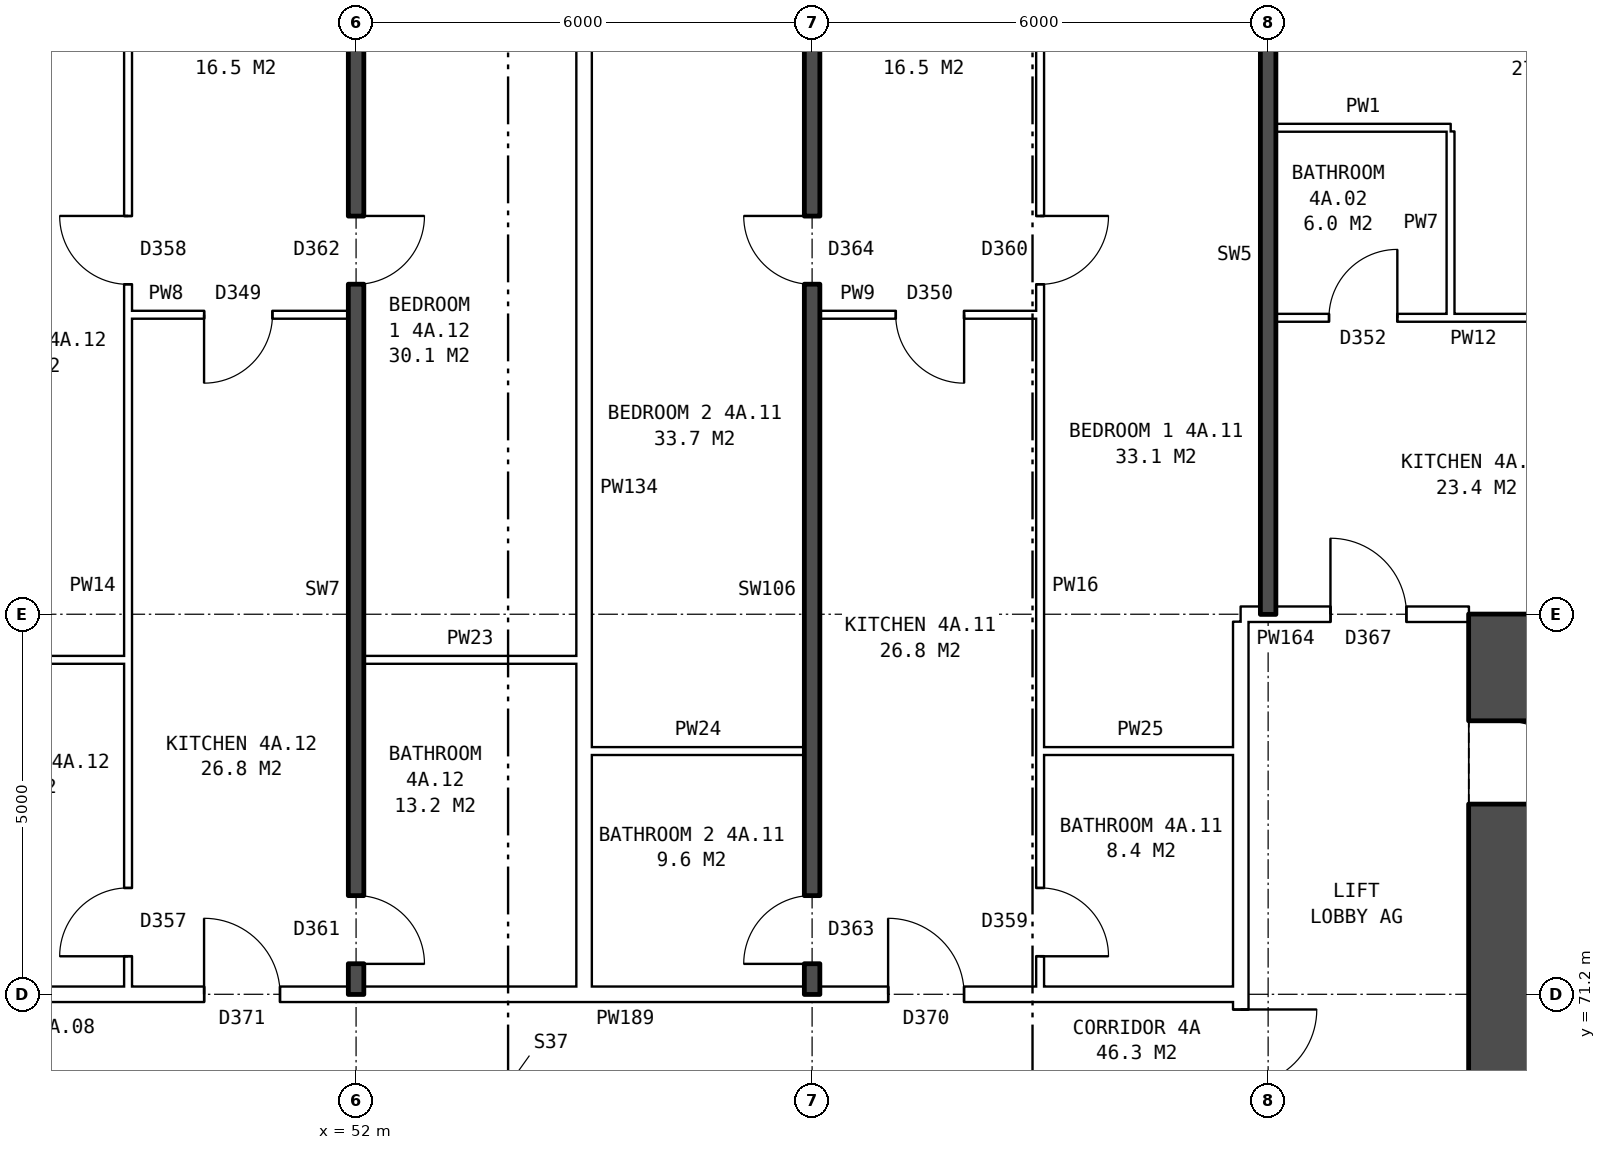
"""IFC4 building model, lengths in metres.
Left out: names, types, materials, properties, quantities, classifications, styles, units other than length and angle.
Written with IfcOpenShell. Run it as: python <this file> out.ifc"""

import sys

from ifc_helpers import new_model, si_unit, direction, frame, frame_2d, origin, place, context, subcontext, project, spatial, rectangle, extrude, element, fill, save


model = new_model("IFC4")
c1 = context("Model", 3, precision=1e-05, world=origin(), true_north=direction((0.0, 1.0)))
c2 = subcontext(c1, "Body", "Model", "MODEL_VIEW")
j1 = project(units=[si_unit("LENGTHUNIT", "METRE"), si_unit("PLANEANGLEUNIT", "RADIAN")], contexts=[c1])
p1 = place(None, origin())
s1 = spatial("IfcSite", under=j1, at=p1, CompositionType="ELEMENT")
p2 = place(p1, origin())
s2 = spatial("IfcBuilding", under=s1, at=p2, CompositionType="ELEMENT")
p3 = place(p2, frame((0.0, 0.0, 19.5)))
s3 = spatial("IfcBuildingStorey", under=s2, at=p3, CompositionType="ELEMENT", Elevation=19.5)
p4 = place(p3, frame((67.09, 64.7, 0.0), z_axis=(0.0, 0.0, 1.0), x_axis=(0.0, 1.0, 0.0)))
e1 = element("IfcWall", 1, at=p4, inside=s3, PredefinedType="SHEAR", context=c2, shape_type="SweptSolid", body=[
    extrude(rectangle(XDim=10.6, YDim=0.9, at=frame_2d((5.3, 0.0))), origin(), (0.0, 0.0, 1.0), 2.85),
])
p5 = place(p4, frame((0.425, 0.0, 0.0)))
e2 = element("IfcOpeningElement", 2, at=p5, cuts=e1, PredefinedType="OPENING", context=c2, shape_type="SweptSolid", body=[
    extrude(rectangle(XDim=1.1, YDim=2.1, at=frame_2d((0.55, 1.05))), frame((0.0, 0.46, 0.0), z_axis=(0.0, -1.0, 0.0), x_axis=(1.0, 0.0, 0.0)), (0.0, 0.0, 1.0), 0.92),
])
p6 = place(p4, frame((9.0, 0.0, 0.0)))
e3 = element("IfcOpeningElement", 3, at=p6, cuts=e1, PredefinedType="OPENING", context=c2, shape_type="SweptSolid", body=[
    extrude(rectangle(XDim=1.1, YDim=2.1, at=frame_2d((0.55, 1.05))), frame((0.0, 0.46, 0.0), z_axis=(0.0, -1.0, 0.0), x_axis=(1.0, 0.0, 0.0)), (0.0, 0.0, 1.0), 0.92),
])
p7 = place(p3, frame((66.64, 75.75, 0.0), z_axis=(0.0, 0.0, 1.0), x_axis=(1.0, 0.0, 0.0)))
e4 = element("IfcWall", 4, at=p7, inside=s3, PredefinedType="SHEAR", context=c2, shape_type="SweptSolid", body=[
    extrude(rectangle(XDim=9.0, YDim=0.9, at=frame_2d((4.5, 0.0))), origin(), (0.0, 0.0, 1.0), 2.85),
])
p8 = place(p3, frame((63.64, 63.9, 0.0), z_axis=(0.0, 0.0, 1.0), x_axis=(0.0, 1.0, 0.0)))
e5 = element("IfcWall", 5, at=p8, inside=s3, PredefinedType="PARTITIONING", context=c2, shape_type="SweptSolid", body=[
    extrude(rectangle(XDim=12.2, YDim=0.2, at=frame_2d((6.1, 0.0))), origin(), (0.0, 0.0, 1.0), 2.85),
])
p9 = place(p8, frame((5.1, 0.0, 0.0)))
e6 = element("IfcOpeningElement", 6, at=p9, cuts=e5, PredefinedType="OPENING", context=c2, shape_type="SweptSolid", body=[
    extrude(rectangle(XDim=2.0, YDim=2.1, at=frame_2d((1.0, 1.05))), frame((0.0, 0.11, 0.0), z_axis=(0.0, -1.0, 0.0), x_axis=(1.0, 0.0, 0.0)), (0.0, 0.0, 1.0), 0.22),
])
p10 = place(p3, frame((44.36, 71.2, 0.0), z_axis=(0.0, 0.0, 1.0), x_axis=(1.0, 0.0, 0.0)))
e7 = element("IfcWall", 7, at=p10, inside=s3, PredefinedType="PARTITIONING", context=c2, shape_type="SweptSolid", body=[
    extrude(rectangle(XDim=19.28, YDim=0.2, at=frame_2d((9.64, 0.0))), origin(), (0.0, 0.0, 1.0), 2.85),
])
p11 = place(p10, frame((14.64, 0.0, 0.0)))
e8 = element("IfcOpeningElement", 8, at=p11, cuts=e7, PredefinedType="OPENING", context=c2, shape_type="SweptSolid", body=[
    extrude(rectangle(XDim=1.0, YDim=2.1, at=frame_2d((0.5, 1.05))), frame((0.0, 0.11, 0.0), z_axis=(0.0, -1.0, 0.0), x_axis=(1.0, 0.0, 0.0)), (0.0, 0.0, 1.0), 0.22),
])
p12 = place(p10, frame((5.64, 0.0, 0.0)))
e9 = element("IfcOpeningElement", 9, at=p12, cuts=e7, PredefinedType="OPENING", context=c2, shape_type="SweptSolid", body=[
    extrude(rectangle(XDim=1.0, YDim=2.1, at=frame_2d((0.5, 1.05))), frame((0.0, 0.11, 0.0), z_axis=(0.0, -1.0, 0.0), x_axis=(1.0, 0.0, 0.0)), (0.0, 0.0, 1.0), 0.22),
])
p13 = place(p3, frame((55.1, 74.4, 0.0), z_axis=(0.0, 0.0, 1.0), x_axis=(1.0, 0.0, 0.0)))
e10 = element("IfcWall", 10, at=p13, inside=s3, PredefinedType="PARTITIONING", context=c2, shape_type="SweptSolid", body=[
    extrude(rectangle(XDim=2.8, YDim=0.1, at=frame_2d((1.4, 0.0))), origin(), (0.0, 0.0, 1.0), 2.85),
])
p14 = place(p3, frame((61.0, 74.4, 0.0), z_axis=(0.0, 0.0, 1.0), x_axis=(1.0, 0.0, 0.0)))
e11 = element("IfcWall", 11, at=p14, inside=s3, PredefinedType="PARTITIONING", context=c2, shape_type="SweptSolid", body=[
    extrude(rectangle(XDim=2.64, YDim=0.1, at=frame_2d((1.32, 0.0))), origin(), (0.0, 0.0, 1.0), 2.85),
])
p15 = place(p3, frame((46.1, 75.6, 0.0), z_axis=(0.0, 0.0, 1.0), x_axis=(1.0, 0.0, 0.0)))
e12 = element("IfcWall", 12, at=p15, inside=s3, PredefinedType="PARTITIONING", context=c2, shape_type="SweptSolid", body=[
    extrude(rectangle(XDim=2.9, YDim=0.1, at=frame_2d((1.45, 0.0))), origin(), (0.0, 0.0, 1.0), 2.85),
])
p16 = place(p3, frame((52.1, 75.6, 0.0), z_axis=(0.0, 0.0, 1.0), x_axis=(1.0, 0.0, 0.0)))
e13 = element("IfcWall", 13, at=p16, inside=s3, PredefinedType="PARTITIONING", context=c2, shape_type="SweptSolid", body=[
    extrude(rectangle(XDim=2.8, YDim=0.1, at=frame_2d((1.4, 0.0))), origin(), (0.0, 0.0, 1.0), 2.85),
])
p17 = place(p3, frame((63.64, 76.2, 0.0), z_axis=(0.0, 0.0, 1.0), x_axis=(1.0, 0.0, 0.0)))
e14 = element("IfcWall", 14, at=p17, inside=s3, PredefinedType="PARTITIONING", context=c2, shape_type="SweptSolid", body=[
    extrude(rectangle(XDim=3.0, YDim=0.2, at=frame_2d((1.5, 0.0))), origin(), (0.0, 0.0, 1.0), 2.85),
])
p18 = place(p17, frame((1.18, 0.0, 0.0)))
e15 = element("IfcOpeningElement", 15, at=p18, cuts=e14, PredefinedType="OPENING", context=c2, shape_type="SweptSolid", body=[
    extrude(rectangle(XDim=1.0, YDim=2.1, at=frame_2d((0.5, 1.05))), frame((0.0, 0.11, 0.0), z_axis=(0.0, -1.0, 0.0), x_axis=(1.0, 0.0, 0.0)), (0.0, 0.0, 1.0), 0.22),
])
p19 = place(p3, frame((64.1, 80.1, 0.0), z_axis=(0.0, 0.0, 1.0), x_axis=(1.0, 0.0, 0.0)))
e16 = element("IfcWall", 16, at=p19, inside=s3, PredefinedType="PARTITIONING", context=c2, shape_type="SweptSolid", body=[
    extrude(rectangle(XDim=5.8, YDim=0.1, at=frame_2d((2.9, 0.0))), origin(), (0.0, 0.0, 1.0), 2.85),
])
p20 = place(p19, frame((3.6, 0.0, 0.0)))
e17 = element("IfcOpeningElement", 17, at=p20, cuts=e16, PredefinedType="OPENING", context=c2, shape_type="SweptSolid", body=[
    extrude(rectangle(XDim=0.9, YDim=2.1, at=frame_2d((0.45, 1.05))), frame((0.0, 0.06, 0.0), z_axis=(0.0, -1.0, 0.0), x_axis=(1.0, 0.0, 0.0)), (0.0, 0.0, 1.0), 0.12),
])
p21 = place(p19, frame((0.7, 0.0, 0.0)))
e18 = element("IfcOpeningElement", 18, at=p21, cuts=e16, PredefinedType="OPENING", context=c2, shape_type="SweptSolid", body=[
    extrude(rectangle(XDim=0.9, YDim=2.1, at=frame_2d((0.45, 1.05))), frame((0.0, 0.06, 0.0), z_axis=(0.0, -1.0, 0.0), x_axis=(1.0, 0.0, 0.0)), (0.0, 0.0, 1.0), 0.12),
])
p22 = place(p3, frame((49.0, 80.14, 0.0), z_axis=(0.0, 0.0, 1.0), x_axis=(1.0, 0.0, 0.0)))
e19 = element("IfcWall", 19, at=p22, inside=s3, PredefinedType="PARTITIONING", context=c2, shape_type="SweptSolid", body=[
    extrude(rectangle(XDim=2.9, YDim=0.1, at=frame_2d((1.45, 0.0))), origin(), (0.0, 0.0, 1.0), 2.85),
])
p23 = place(p22, frame((1.0, 0.0, 0.0)))
e20 = element("IfcOpeningElement", 20, at=p23, cuts=e19, PredefinedType="OPENING", context=c2, shape_type="SweptSolid", body=[
    extrude(rectangle(XDim=0.9, YDim=2.1, at=frame_2d((0.45, 1.05))), frame((0.0, 0.06, 0.0), z_axis=(0.0, -1.0, 0.0), x_axis=(1.0, 0.0, 0.0)), (0.0, 0.0, 1.0), 0.12),
])
p24 = place(p3, frame((58.1, 80.14, 0.0), z_axis=(0.0, 0.0, 1.0), x_axis=(1.0, 0.0, 0.0)))
e21 = element("IfcWall", 21, at=p24, inside=s3, PredefinedType="PARTITIONING", context=c2, shape_type="SweptSolid", body=[
    extrude(rectangle(XDim=2.9, YDim=0.1, at=frame_2d((1.45, 0.0))), origin(), (0.0, 0.0, 1.0), 2.85),
])
p25 = place(p24, frame((1.0, 0.0, 0.0)))
e22 = element("IfcOpeningElement", 22, at=p25, cuts=e21, PredefinedType="OPENING", context=c2, shape_type="SweptSolid", body=[
    extrude(rectangle(XDim=0.9, YDim=2.1, at=frame_2d((0.45, 1.05))), frame((0.0, 0.06, 0.0), z_axis=(0.0, -1.0, 0.0), x_axis=(1.0, 0.0, 0.0)), (0.0, 0.0, 1.0), 0.12),
])
p26 = place(p3, frame((64.1, 82.6, 0.0), z_axis=(0.0, 0.0, 1.0), x_axis=(1.0, 0.0, 0.0)))
e23 = element("IfcWall", 23, at=p26, inside=s3, PredefinedType="PARTITIONING", context=c2, shape_type="SweptSolid", body=[
    extrude(rectangle(XDim=2.3, YDim=0.1, at=frame_2d((1.15, 0.0))), origin(), (0.0, 0.0, 1.0), 2.85),
])
p27 = place(p3, frame((49.0, 71.3, 0.0), z_axis=(0.0, 0.0, 1.0), x_axis=(0.0, 1.0, 0.0)))
e24 = element("IfcWall", 24, at=p27, inside=s3, PredefinedType="PARTITIONING", context=c2, shape_type="SweptSolid", body=[
    extrude(rectangle(XDim=14.34, YDim=0.1, at=frame_2d((7.17, 0.0))), origin(), (0.0, 0.0, 1.0), 2.85),
])
p28 = place(p27, frame((9.24, 0.0, 0.0)))
e25 = element("IfcOpeningElement", 25, at=p28, cuts=e24, PredefinedType="OPENING", context=c2, shape_type="SweptSolid", body=[
    extrude(rectangle(XDim=0.9, YDim=2.1, at=frame_2d((0.45, 1.05))), frame((0.0, 0.06, 0.0), z_axis=(0.0, -1.0, 0.0), x_axis=(1.0, 0.0, 0.0)), (0.0, 0.0, 1.0), 0.12),
])
p29 = place(p27, frame((0.4, 0.0, 0.0)))
e26 = element("IfcOpeningElement", 26, at=p29, cuts=e24, PredefinedType="OPENING", context=c2, shape_type="SweptSolid", body=[
    extrude(rectangle(XDim=0.9, YDim=2.1, at=frame_2d((0.45, 1.05))), frame((0.0, 0.06, 0.0), z_axis=(0.0, -1.0, 0.0), x_axis=(1.0, 0.0, 0.0)), (0.0, 0.0, 1.0), 0.12),
])
p30 = place(p3, frame((52.0, 71.2, 0.0), z_axis=(0.0, 0.0, 1.0), x_axis=(0.0, 1.0, 0.0)))
e27 = element("IfcWall", 27, at=p30, inside=s3, PredefinedType="SOLIDWALL", context=c2, shape_type="SweptSolid", body=[
    extrude(rectangle(XDim=14.44, YDim=0.2, at=frame_2d((7.22, 0.0))), origin(), (0.0, 0.0, 1.0), 2.85),
])
p31 = place(p30, frame((9.34, 0.0, 0.0)))
e28 = element("IfcOpeningElement", 28, at=p31, cuts=e27, PredefinedType="OPENING", context=c2, shape_type="SweptSolid", body=[
    extrude(rectangle(XDim=0.9, YDim=2.1, at=frame_2d((0.45, 1.05))), frame((0.0, 0.11, 0.0), z_axis=(0.0, -1.0, 0.0), x_axis=(1.0, 0.0, 0.0)), (0.0, 0.0, 1.0), 0.22),
])
p32 = place(p30, frame((0.4, 0.0, 0.0)))
e29 = element("IfcOpeningElement", 29, at=p32, cuts=e27, PredefinedType="OPENING", context=c2, shape_type="SweptSolid", body=[
    extrude(rectangle(XDim=0.9, YDim=2.1, at=frame_2d((0.45, 1.05))), frame((0.0, 0.11, 0.0), z_axis=(0.0, -1.0, 0.0), x_axis=(1.0, 0.0, 0.0)), (0.0, 0.0, 1.0), 0.22),
])
p33 = place(p3, frame((55.0, 71.3, 0.0), z_axis=(0.0, 0.0, 1.0), x_axis=(0.0, 1.0, 0.0)))
e30 = element("IfcWall", 30, at=p33, inside=s3, PredefinedType="PARTITIONING", context=c2, shape_type="SweptSolid", body=[
    extrude(rectangle(XDim=14.34, YDim=0.2, at=frame_2d((7.17, 0.0))), origin(), (0.0, 0.0, 1.0), 2.85),
])
p34 = place(p3, frame((58.0, 71.2, 0.0), z_axis=(0.0, 0.0, 1.0), x_axis=(0.0, 1.0, 0.0)))
e31 = element("IfcWall", 31, at=p34, inside=s3, PredefinedType="SOLIDWALL", context=c2, shape_type="SweptSolid", body=[
    extrude(rectangle(XDim=14.44, YDim=0.2, at=frame_2d((7.22, 0.0))), origin(), (0.0, 0.0, 1.0), 2.85),
])
p35 = place(p34, frame((9.34, 0.0, 0.0)))
e32 = element("IfcOpeningElement", 32, at=p35, cuts=e31, PredefinedType="OPENING", context=c2, shape_type="SweptSolid", body=[
    extrude(rectangle(XDim=0.9, YDim=2.1, at=frame_2d((0.45, 1.05))), frame((0.0, 0.11, 0.0), z_axis=(0.0, -1.0, 0.0), x_axis=(1.0, 0.0, 0.0)), (0.0, 0.0, 1.0), 0.22),
])
p36 = place(p34, frame((0.4, 0.0, 0.0)))
e33 = element("IfcOpeningElement", 33, at=p36, cuts=e31, PredefinedType="OPENING", context=c2, shape_type="SweptSolid", body=[
    extrude(rectangle(XDim=0.9, YDim=2.1, at=frame_2d((0.45, 1.05))), frame((0.0, 0.11, 0.0), z_axis=(0.0, -1.0, 0.0), x_axis=(1.0, 0.0, 0.0)), (0.0, 0.0, 1.0), 0.22),
])
p37 = place(p3, frame((61.0, 71.3, 0.0), z_axis=(0.0, 0.0, 1.0), x_axis=(0.0, 1.0, 0.0)))
e34 = element("IfcWall", 34, at=p37, inside=s3, PredefinedType="PARTITIONING", context=c2, shape_type="SweptSolid", body=[
    extrude(rectangle(XDim=14.34, YDim=0.1, at=frame_2d((7.17, 0.0))), origin(), (0.0, 0.0, 1.0), 2.85),
])
p38 = place(p37, frame((9.24, 0.0, 0.0)))
e35 = element("IfcOpeningElement", 35, at=p38, cuts=e34, PredefinedType="OPENING", context=c2, shape_type="SweptSolid", body=[
    extrude(rectangle(XDim=0.9, YDim=2.1, at=frame_2d((0.45, 1.05))), frame((0.0, 0.06, 0.0), z_axis=(0.0, -1.0, 0.0), x_axis=(1.0, 0.0, 0.0)), (0.0, 0.0, 1.0), 0.12),
])
p39 = place(p37, frame((0.4, 0.0, 0.0)))
e36 = element("IfcOpeningElement", 36, at=p39, cuts=e34, PredefinedType="OPENING", context=c2, shape_type="SweptSolid", body=[
    extrude(rectangle(XDim=0.9, YDim=2.1, at=frame_2d((0.45, 1.05))), frame((0.0, 0.06, 0.0), z_axis=(0.0, -1.0, 0.0), x_axis=(1.0, 0.0, 0.0)), (0.0, 0.0, 1.0), 0.12),
])
p40 = place(p3, frame((64.0, 76.2, 0.0), z_axis=(0.0, 0.0, 1.0), x_axis=(0.0, 1.0, 0.0)))
e37 = element("IfcWall", 37, at=p40, inside=s3, PredefinedType="SOLIDWALL", context=c2, shape_type="SweptSolid", body=[
    extrude(rectangle(XDim=9.44, YDim=0.2, at=frame_2d((4.72, 0.0))), origin(), (0.0, 0.0, 1.0), 2.85),
])
p41 = place(p3, frame((66.4, 80.15, 0.0), z_axis=(0.0, 0.0, 1.0), x_axis=(0.0, 1.0, 0.0)))
e38 = element("IfcWall", 38, at=p41, inside=s3, PredefinedType="PARTITIONING", context=c2, shape_type="SweptSolid", body=[
    extrude(rectangle(XDim=2.4, YDim=0.1, at=frame_2d((1.2, 0.0))), origin(), (0.0, 0.0, 1.0), 2.85),
])
p42 = place(p9, frame((2.0, 0.0, 0.0), z_axis=(0.0, 0.0, 1.0), x_axis=(-1.0, 0.0, 0.0)))
e39 = element("IfcDoor", 39, at=p42, inside=s3, OperationType="DOUBLE_DOOR_SINGLE_SWING", PredefinedType="DOOR", context=c2, shape_type="SweptSolid", body=[
    extrude(rectangle(XDim=2.0, YDim=2.1, at=frame_2d((1.0, 1.05))), frame((0.0, 0.025, 0.0), z_axis=(0.0, -1.0, 0.0), x_axis=(1.0, 0.0, 0.0)), (0.0, 0.0, 1.0), 0.05),
])
fill(e6, e39)
p43 = place(p18, origin())
e40 = element("IfcDoor", 40, at=p43, inside=s3, OperationType="SINGLE_SWING_LEFT", PredefinedType="DOOR", context=c2, shape_type="SweptSolid", body=[
    extrude(rectangle(XDim=1.0, YDim=2.1, at=frame_2d((0.5, 1.05))), frame((0.0, 0.025, 0.0), z_axis=(0.0, -1.0, 0.0), x_axis=(1.0, 0.0, 0.0)), (0.0, 0.0, 1.0), 0.05),
])
fill(e15, e40)
p44 = place(p21, origin())
e41 = element("IfcDoor", 41, at=p44, inside=s3, OperationType="SINGLE_SWING_RIGHT", PredefinedType="DOOR", context=c2, shape_type="SweptSolid", body=[
    extrude(rectangle(XDim=0.9, YDim=2.1, at=frame_2d((0.45, 1.05))), frame((0.0, 0.025, 0.0), z_axis=(0.0, -1.0, 0.0), x_axis=(1.0, 0.0, 0.0)), (0.0, 0.0, 1.0), 0.05),
])
fill(e18, e41)
p45 = place(p38, frame((0.9, 0.0, 0.0), z_axis=(0.0, 0.0, 1.0), x_axis=(-1.0, 0.0, 0.0)))
e42 = element("IfcDoor", 42, at=p45, inside=s3, OperationType="SINGLE_SWING_LEFT", PredefinedType="DOOR", context=c2, shape_type="SweptSolid", body=[
    extrude(rectangle(XDim=0.9, YDim=2.1, at=frame_2d((0.45, 1.05))), frame((0.0, 0.025, 0.0), z_axis=(0.0, -1.0, 0.0), x_axis=(1.0, 0.0, 0.0)), (0.0, 0.0, 1.0), 0.05),
])
fill(e35, e42)
p46 = place(p35, origin())
e43 = element("IfcDoor", 43, at=p46, inside=s3, OperationType="SINGLE_SWING_RIGHT", PredefinedType="DOOR", context=c2, shape_type="SweptSolid", body=[
    extrude(rectangle(XDim=0.9, YDim=2.1, at=frame_2d((0.45, 1.05))), frame((0.0, 0.025, 0.0), z_axis=(0.0, -1.0, 0.0), x_axis=(1.0, 0.0, 0.0)), (0.0, 0.0, 1.0), 0.05),
])
fill(e32, e43)
p47 = place(p11, origin())
e44 = element("IfcDoor", 44, at=p47, inside=s3, OperationType="SINGLE_SWING_LEFT", PredefinedType="DOOR", context=c2, shape_type="SweptSolid", body=[
    extrude(rectangle(XDim=1.0, YDim=2.1, at=frame_2d((0.5, 1.05))), frame((0.0, 0.025, 0.0), z_axis=(0.0, -1.0, 0.0), x_axis=(1.0, 0.0, 0.0)), (0.0, 0.0, 1.0), 0.05),
])
fill(e8, e44)
p48 = place(p25, frame((0.9, 0.0, 0.0), z_axis=(0.0, 0.0, 1.0), x_axis=(-1.0, 0.0, 0.0)))
e45 = element("IfcDoor", 45, at=p48, inside=s3, OperationType="SINGLE_SWING_LEFT", PredefinedType="DOOR", context=c2, shape_type="SweptSolid", body=[
    extrude(rectangle(XDim=0.9, YDim=2.1, at=frame_2d((0.45, 1.05))), frame((0.0, 0.025, 0.0), z_axis=(0.0, -1.0, 0.0), x_axis=(1.0, 0.0, 0.0)), (0.0, 0.0, 1.0), 0.05),
])
fill(e22, e45)
p49 = place(p39, frame((0.9, 0.0, 0.0), z_axis=(0.0, 0.0, 1.0), x_axis=(-1.0, 0.0, 0.0)))
e46 = element("IfcDoor", 46, at=p49, inside=s3, OperationType="SINGLE_SWING_RIGHT", PredefinedType="DOOR", context=c2, shape_type="SweptSolid", body=[
    extrude(rectangle(XDim=0.9, YDim=2.1, at=frame_2d((0.45, 1.05))), frame((0.0, 0.025, 0.0), z_axis=(0.0, -1.0, 0.0), x_axis=(1.0, 0.0, 0.0)), (0.0, 0.0, 1.0), 0.05),
])
fill(e36, e46)
p50 = place(p36, origin())
e47 = element("IfcDoor", 47, at=p50, inside=s3, OperationType="SINGLE_SWING_LEFT", PredefinedType="DOOR", context=c2, shape_type="SweptSolid", body=[
    extrude(rectangle(XDim=0.9, YDim=2.1, at=frame_2d((0.45, 1.05))), frame((0.0, 0.025, 0.0), z_axis=(0.0, -1.0, 0.0), x_axis=(1.0, 0.0, 0.0)), (0.0, 0.0, 1.0), 0.05),
])
fill(e33, e47)
p51 = place(p31, frame((0.9, 0.0, 0.0), z_axis=(0.0, 0.0, 1.0), x_axis=(-1.0, 0.0, 0.0)))
e48 = element("IfcDoor", 48, at=p51, inside=s3, OperationType="SINGLE_SWING_LEFT", PredefinedType="DOOR", context=c2, shape_type="SweptSolid", body=[
    extrude(rectangle(XDim=0.9, YDim=2.1, at=frame_2d((0.45, 1.05))), frame((0.0, 0.025, 0.0), z_axis=(0.0, -1.0, 0.0), x_axis=(1.0, 0.0, 0.0)), (0.0, 0.0, 1.0), 0.05),
])
fill(e28, e48)
p52 = place(p28, origin())
e49 = element("IfcDoor", 49, at=p52, inside=s3, OperationType="SINGLE_SWING_RIGHT", PredefinedType="DOOR", context=c2, shape_type="SweptSolid", body=[
    extrude(rectangle(XDim=0.9, YDim=2.1, at=frame_2d((0.45, 1.05))), frame((0.0, 0.025, 0.0), z_axis=(0.0, -1.0, 0.0), x_axis=(1.0, 0.0, 0.0)), (0.0, 0.0, 1.0), 0.05),
])
fill(e25, e49)
p53 = place(p12, origin())
e50 = element("IfcDoor", 50, at=p53, inside=s3, OperationType="SINGLE_SWING_LEFT", PredefinedType="DOOR", context=c2, shape_type="SweptSolid", body=[
    extrude(rectangle(XDim=1.0, YDim=2.1, at=frame_2d((0.5, 1.05))), frame((0.0, 0.025, 0.0), z_axis=(0.0, -1.0, 0.0), x_axis=(1.0, 0.0, 0.0)), (0.0, 0.0, 1.0), 0.05),
])
fill(e9, e50)
p54 = place(p23, frame((0.9, 0.0, 0.0), z_axis=(0.0, 0.0, 1.0), x_axis=(-1.0, 0.0, 0.0)))
e51 = element("IfcDoor", 51, at=p54, inside=s3, OperationType="SINGLE_SWING_RIGHT", PredefinedType="DOOR", context=c2, shape_type="SweptSolid", body=[
    extrude(rectangle(XDim=0.9, YDim=2.1, at=frame_2d((0.45, 1.05))), frame((0.0, 0.025, 0.0), z_axis=(0.0, -1.0, 0.0), x_axis=(1.0, 0.0, 0.0)), (0.0, 0.0, 1.0), 0.05),
])
fill(e20, e51)
p55 = place(p32, frame((0.9, 0.0, 0.0), z_axis=(0.0, 0.0, 1.0), x_axis=(-1.0, 0.0, 0.0)))
e52 = element("IfcDoor", 52, at=p55, inside=s3, OperationType="SINGLE_SWING_RIGHT", PredefinedType="DOOR", context=c2, shape_type="SweptSolid", body=[
    extrude(rectangle(XDim=0.9, YDim=2.1, at=frame_2d((0.45, 1.05))), frame((0.0, 0.025, 0.0), z_axis=(0.0, -1.0, 0.0), x_axis=(1.0, 0.0, 0.0)), (0.0, 0.0, 1.0), 0.05),
])
fill(e29, e52)
p56 = place(p29, origin())
e53 = element("IfcDoor", 53, at=p56, inside=s3, OperationType="SINGLE_SWING_LEFT", PredefinedType="DOOR", context=c2, shape_type="SweptSolid", body=[
    extrude(rectangle(XDim=0.9, YDim=2.1, at=frame_2d((0.45, 1.05))), frame((0.0, 0.025, 0.0), z_axis=(0.0, -1.0, 0.0), x_axis=(1.0, 0.0, 0.0)), (0.0, 0.0, 1.0), 0.05),
])
fill(e26, e53)
save(model, sys.argv[1])
